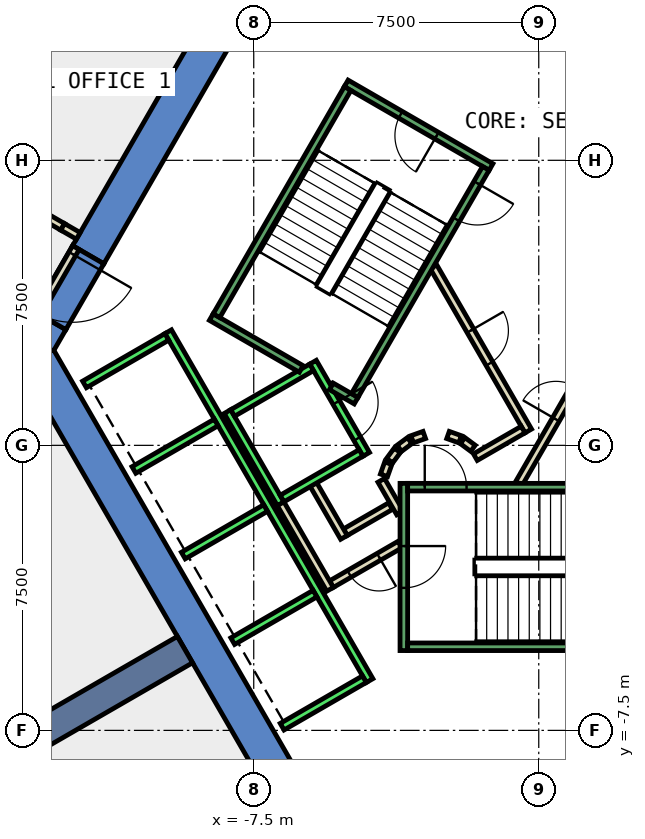
"""IFC4 building model, lengths in metres.
Left out: names, types, materials, properties, quantities, classifications, styles, units other than length and angle.
Written with IfcOpenShell. Run it as: python <this file> out.ifc"""

import sys

from ifc_helpers import new_model, si_unit, direction, frame, frame_2d, origin, place, context, subcontext, project, spatial, polyline, rectangle, outline, extrude, element, fill, save


model = new_model("IFC4")
c1 = context("Model", 3, precision=1e-05, world=origin(), true_north=direction((0.0, 1.0)))
c2 = subcontext(c1, "Body", "Model", "MODEL_VIEW")
j1 = project(units=[si_unit("LENGTHUNIT", "METRE"), si_unit("PLANEANGLEUNIT", "RADIAN")], contexts=[c1])
p1 = place(None, origin())
s1 = spatial("IfcSite", under=j1, at=p1, CompositionType="ELEMENT")
p2 = place(p1, origin())
s2 = spatial("IfcBuilding", under=s1, at=p2, CompositionType="ELEMENT")
p3 = place(p2, frame((0.0, 0.0, 72.8)))
s3 = spatial("IfcBuildingStorey", under=s2, at=p3, CompositionType="ELEMENT", Elevation=72.8)
p4 = place(p3, frame((0.0, 0.0, -0.4)))
e1 = element("IfcWall", 1, at=p4, inside=s3, PredefinedType="SHEAR", context=c2, shape_type="SweptSolid", body=[
    extrude(outline(polyline([(-12.267, 5.252), (-11.444, 4.777), (-6.38, 13.55), (-6.928, 14.5), (-12.267, 5.252)])), origin(), (0.0, 0.0, 1.0), 4.2),
])
p5 = place(p3, frame((0.0, 0.0, -0.4)))
e2 = element("IfcWall", 2, at=p5, inside=s3, PredefinedType="SHEAR", context=c2, shape_type="SweptSolid", body=[
    extrude(outline(polyline([(-12.444, 3.045), (-13.267, 3.52), (-13.856, 2.5), (-12.759, 2.5), (-12.444, 3.045)])), origin(), (0.0, 0.0, 1.0), 4.2),
])
p6 = place(p3, frame((0.0, 0.0, 3.6)))
e3 = element("IfcWall", 3, at=p6, inside=s3, PredefinedType="SHEAR", context=c2, shape_type="SweptSolid", body=[
    extrude(outline(polyline([(-13.267, 3.52), (-12.444, 3.045), (-11.444, 4.777), (-12.267, 5.252), (-13.267, 3.52)])), origin(), (0.0, 0.0, 1.0), 0.2),
])
p7 = place(p3, frame((0.0, 0.0, -0.4)))
e4 = element("IfcWall", 4, at=p7, inside=s3, PredefinedType="SHEAR", context=c2, shape_type="SweptSolid", body=[
    extrude(outline(polyline([(-13.856, 2.5), (-6.928, -9.5), (-6.38, -8.55), (-12.759, 2.5), (-13.856, 2.5)])), origin(), (0.0, 0.0, 1.0), 4.2),
])
p8 = place(p3, frame((-9.31, -5.375, -0.4), z_axis=(0.0, 0.0, 1.0), x_axis=(-0.866017533419, -0.500013631625, 0.0)))
e5 = element("IfcWall", 5, at=p8, inside=s3, PredefinedType="SHEAR", context=c2, shape_type="SweptSolid", body=[
    extrude(rectangle(XDim=9.0, YDim=0.8, at=frame_2d((4.5, 0.0))), origin(), (0.0, 0.0, 1.0), 4.2),
])
p9 = place(p3, frame((-17.133, 8.408, 0.0), z_axis=(0.0, 0.0, 1.0), x_axis=(0.866005140137, -0.500035096025, 0.0)))
e6 = element("IfcWall", 6, at=p9, inside=s3, PredefinedType="PARTITIONING", context=c2, shape_type="SweptSolid", body=[
    extrude(rectangle(XDim=5.317, YDim=0.2, at=frame_2d((2.659, 0.0))), origin(), (0.0, 0.0, 1.0), 3.8),
])
p10 = place(p9, frame((2.396, 0.0, 0.0)))
e7 = element("IfcOpeningElement", 7, at=p10, cuts=e6, PredefinedType="OPENING", context=c2, shape_type="SweptSolid", body=[
    extrude(rectangle(XDim=1.0, YDim=2.1, at=frame_2d((0.5, 1.05))), frame((0.0, 0.11, 0.0), z_axis=(0.0, -1.0, 0.0), x_axis=(1.0, 0.0, 0.0)), (0.0, 0.0, 1.0), 0.22),
])
p11 = place(p3, frame((-3.9, -1.599, 0.0), z_axis=(0.0, 0.0, 1.0), x_axis=(-0.865969445389, -0.500096910261, 0.0)))
e8 = element("IfcWall", 8, at=p11, inside=s3, PredefinedType="PARTITIONING", context=c2, shape_type="SweptSolid", body=[
    extrude(rectangle(XDim=1.373, YDim=0.2, at=frame_2d((0.687, 0.0))), origin(), (0.0, 0.0, 1.0), 3.8),
])
p12 = place(p3, frame((-5.126, -2.422, 0.0), z_axis=(0.0, 0.0, 1.0), x_axis=(-0.500062241894, 0.865989465428, 0.0)))
e9 = element("IfcWall", 9, at=p12, inside=s3, PredefinedType="PARTITIONING", context=c2, shape_type="SweptSolid", body=[
    extrude(rectangle(XDim=1.7, YDim=0.2, at=frame_2d((0.85, 0.0))), origin(), (0.0, 0.0, 1.0), 3.8),
])
p13 = place(p3, frame((-3.65, -2.61, 0.0), z_axis=(0.0, 0.0, 1.0), x_axis=(-0.866072462134, -0.499918483688, 0.0)))
e10 = element("IfcWall", 10, at=p13, inside=s3, PredefinedType="PARTITIONING", context=c2, shape_type="SweptSolid", body=[
    extrude(rectangle(XDim=2.084, YDim=0.2, at=frame_2d((1.042, 0.0))), origin(), (0.0, 0.0, 1.0), 3.8),
])
p14 = place(p13, frame((0.642, 0.0, 0.0)))
e11 = element("IfcOpeningElement", 11, at=p14, cuts=e10, PredefinedType="OPENING", context=c2, shape_type="SweptSolid", body=[
    extrude(rectangle(XDim=0.9, YDim=2.1, at=frame_2d((0.45, 1.05))), frame((0.0, 0.11, 0.0), z_axis=(0.0, -1.0, 0.0), x_axis=(1.0, 0.0, 0.0)), (0.0, 0.0, 1.0), 0.22),
])
p15 = place(p3, frame((-5.492, -3.788, 0.0), z_axis=(0.0, 0.0, 1.0), x_axis=(-0.500008949224, 0.866020236886, 0.0)))
e12 = element("IfcWall", 12, at=p15, inside=s3, PredefinedType="PARTITIONING", context=c2, shape_type="SweptSolid", body=[
    extrude(rectangle(XDim=2.68, YDim=0.2, at=frame_2d((1.34, 0.0))), origin(), (0.0, 0.0, 1.0), 3.8),
])
p16 = place(p3, frame((-4.145, -0.92, 0.0), z_axis=(0.0, 0.0, 1.0), x_axis=(0.499743786207, -0.866173278362, 0.0)))
e13 = element("IfcWall", 13, at=p16, inside=s3, PredefinedType="PARTITIONING", context=c2, shape_type="SweptSolid", body=[
    extrude(rectangle(XDim=0.991, YDim=0.2, at=frame_2d((0.495, 0.0))), origin(), (0.0, 0.0, 1.0), 3.8),
])
p17 = place(p3, frame((-0.52, -1.0, 0.0), z_axis=(0.0, 0.0, 1.0), x_axis=(0.50011622646, 0.865958290007, 0.0)))
e14 = element("IfcWall", 14, at=p17, inside=s3, PredefinedType="PARTITIONING", context=c2, shape_type="SweptSolid", body=[
    extrude(rectangle(XDim=4.991, YDim=0.2, at=frame_2d((2.496, 0.0))), origin(), (0.0, 0.0, 1.0), 3.8),
])
p18 = place(p17, frame((1.945, 0.0, 0.0)))
e15 = element("IfcOpeningElement", 15, at=p18, cuts=e14, PredefinedType="OPENING", context=c2, shape_type="SweptSolid", body=[
    extrude(rectangle(XDim=1.0, YDim=2.1, at=frame_2d((0.5, 1.05))), frame((0.0, 0.11, 0.0), z_axis=(0.0, -1.0, 0.0), x_axis=(1.0, 0.0, 0.0)), (0.0, 0.0, 1.0), 0.22),
])
p19 = place(p3, frame((-2.771, 4.7, 0.0), z_axis=(0.0, 0.0, 1.0), x_axis=(0.499969479948, -0.866043023828, 0.0)))
e16 = element("IfcWall", 16, at=p19, inside=s3, PredefinedType="PARTITIONING", context=c2, shape_type="SweptSolid", body=[
    extrude(rectangle(XDim=4.99, YDim=0.2, at=frame_2d((2.495, 0.0))), origin(), (0.0, 0.0, 1.0), 3.8),
])
p20 = place(p19, frame((1.945, 0.0, 0.0)))
e17 = element("IfcOpeningElement", 17, at=p20, cuts=e16, PredefinedType="OPENING", context=c2, shape_type="SweptSolid", body=[
    extrude(rectangle(XDim=1.0, YDim=2.1, at=frame_2d((0.5, 1.05))), frame((0.0, 0.11, 0.0), z_axis=(0.0, -1.0, 0.0), x_axis=(1.0, 0.0, 0.0)), (0.0, 0.0, 1.0), 0.22),
])
p21 = place(p3, frame((-0.412, 0.414, 0.0), z_axis=(0.0, 0.0, 1.0), x_axis=(-0.866017369001, -0.500013916395, 0.0)))
e18 = element("IfcWall", 18, at=p21, inside=s3, PredefinedType="PARTITIONING", context=c2, shape_type="SweptSolid", body=[
    extrude(rectangle(XDim=1.45, YDim=0.2, at=frame_2d((0.725, 0.0))), origin(), (0.0, 0.0, 1.0), 3.8),
])
p22 = place(p3, frame((-1.731, -0.077, 0.0), z_axis=(0.0, 0.0, 1.0), x_axis=(-0.804311165252, 0.594208338422, 0.0)))
e19 = element("IfcWall", 19, at=p22, inside=s3, PredefinedType="PARTITIONING", context=c2, shape_type="SweptSolid", body=[
    extrude(rectangle(XDim=0.338, YDim=0.2, at=frame_2d((0.169, 0.0))), origin(), (0.0, 0.0, 1.0), 3.8),
])
p23 = place(p3, frame((-2.07, 0.16, 0.0), z_axis=(0.0, 0.0, 1.0), x_axis=(-0.942199461132, 0.335052496547, 0.0)))
e20 = element("IfcWall", 20, at=p23, inside=s3, PredefinedType="PARTITIONING", context=c2, shape_type="SweptSolid", body=[
    extrude(rectangle(XDim=0.337, YDim=0.2, at=frame_2d((0.169, 0.0))), origin(), (0.0, 0.0, 1.0), 3.8),
])
p24 = place(p3, frame((-3.012, 0.273, 0.0), z_axis=(0.0, 0.0, 1.0), x_axis=(-0.942280615813, -0.334824194261, 0.0)))
e21 = element("IfcWall", 21, at=p24, inside=s3, PredefinedType="PARTITIONING", context=c2, shape_type="SweptSolid", body=[
    extrude(rectangle(XDim=0.338, YDim=0.2, at=frame_2d((0.169, 0.0))), origin(), (0.0, 0.0, 1.0), 3.8),
])
p25 = place(p3, frame((-3.397, 0.124, 0.0), z_axis=(0.0, 0.0, 1.0), x_axis=(-0.804311165252, -0.594208338422, 0.0)))
e22 = element("IfcWall", 22, at=p25, inside=s3, PredefinedType="PARTITIONING", context=c2, shape_type="SweptSolid", body=[
    extrude(rectangle(XDim=0.338, YDim=0.2, at=frame_2d((0.169, 0.0))), origin(), (0.0, 0.0, 1.0), 3.8),
])
p26 = place(p3, frame((-3.723, -0.131, 0.0), z_axis=(0.0, 0.0, 1.0), x_axis=(-0.594675113454, -0.803966112121, 0.0)))
e23 = element("IfcWall", 23, at=p26, inside=s3, PredefinedType="PARTITIONING", context=c2, shape_type="SweptSolid", body=[
    extrude(rectangle(XDim=0.338, YDim=0.2, at=frame_2d((0.169, 0.0))), origin(), (0.0, 0.0, 1.0), 3.8),
])
p27 = place(p3, frame((-3.96, -0.47, 0.0), z_axis=(0.0, 0.0, 1.0), x_axis=(-0.334824194261, -0.942280615813, 0.0)))
e24 = element("IfcWall", 24, at=p27, inside=s3, PredefinedType="PARTITIONING", context=c2, shape_type="SweptSolid", body=[
    extrude(rectangle(XDim=0.338, YDim=0.2, at=frame_2d((0.169, 0.0))), origin(), (0.0, 0.0, 1.0), 3.8),
])
p28 = place(p3, frame((-12.18, 5.202, 0.0), z_axis=(0.0, 0.0, 1.0), x_axis=(-0.50002537861, -0.866010750942, 0.0)))
e25 = element("IfcWall", 25, at=p28, inside=s3, PredefinedType="PARTITIONING", context=c2, shape_type="SweptSolid", body=[
    extrude(rectangle(XDim=2.0, YDim=0.2, at=frame_2d((1.0, 0.0))), origin(), (0.0, 0.0, 1.0), 2.4),
])
p29 = place(p28, frame((0.19, 0.0, 0.0)))
e26 = element("IfcOpeningElement", 26, at=p29, cuts=e25, PredefinedType="OPENING", context=c2, shape_type="SweptSolid", body=[
    extrude(rectangle(XDim=1.8, YDim=2.1, at=frame_2d((0.9, 1.05))), frame((0.0, 0.11, 0.0), z_axis=(0.0, -1.0, 0.0), x_axis=(1.0, 0.0, 0.0)), (0.0, 0.0, 1.0), 0.22),
])
p30 = place(p3, frame((-12.528, 5.749, 0.0), z_axis=(0.0, 0.0, 1.0), x_axis=(0.866305462299, -0.499514610387, 0.0)))
e27 = element("IfcWall", 27, at=p30, inside=s3, PredefinedType="PARTITIONING", context=c2, shape_type="SweptSolid", body=[
    extrude(rectangle(XDim=0.475, YDim=0.2, at=frame_2d((0.237, 0.0))), origin(), (0.0, 0.0, 1.0), 2.4),
])
p31 = place(p3, frame((-5.94, 2.188, 0.0), z_axis=(0.0, 0.0, 1.0), x_axis=(0.49994636267, -0.866056369097, 0.0)))
e28 = element("IfcWall", 28, at=p31, inside=s3, PredefinedType="STANDARD", context=c2, shape_type="SweptSolid", body=[
    extrude(rectangle(XDim=2.8, YDim=0.2, at=frame_2d((1.4, 0.0))), origin(), (0.0, 0.0, 1.0), 3.8),
])
p32 = place(p31, frame((1.225, 0.0, 0.0)))
e29 = element("IfcOpeningElement", 29, at=p32, cuts=e28, PredefinedType="OPENING", context=c2, shape_type="SweptSolid", body=[
    extrude(rectangle(XDim=1.1, YDim=2.1, at=frame_2d((0.55, 1.05))), frame((0.0, 0.11, 0.0), z_axis=(0.0, -1.0, 0.0), x_axis=(1.0, 0.0, 0.0)), (0.0, 0.0, 1.0), 0.22),
])
p33 = place(p3, frame((-8.192, 0.888, 0.0), z_axis=(0.0, 0.0, 1.0), x_axis=(0.49994636267, -0.866056369097, 0.0)))
e30 = element("IfcWall", 30, at=p33, inside=s3, PredefinedType="STANDARD", context=c2, shape_type="SweptSolid", body=[
    extrude(rectangle(XDim=2.8, YDim=0.2, at=frame_2d((1.4, 0.0))), origin(), (0.0, 0.0, 1.0), 3.8),
])
for number, where, z_axis, x_axis in (
    (31, (-5.977, 2.052, 0.0), (0.0, 0.0, 1.0), (-0.866, -0.5, 0.0)),
    (32, (-4.677, -0.2, 0.0), (0.0, 0.0, 1.0), (-0.866, -0.5, 0.0)),
):
    element("IfcWall", number, at=place(p3, frame(where, z_axis=z_axis, x_axis=x_axis)), inside=s3, PredefinedType="STANDARD", context=c2, shape_type="SweptSolid", body=[
        extrude(rectangle(XDim=2.399, YDim=0.2, at=frame_2d((1.2, 0.0))), origin(), (0.0, 0.0, 1.0), 3.8),
    ])
p34 = place(p3, frame((-9.751, 2.99, 0.0), z_axis=(0.0, 0.0, 1.0), x_axis=(0.50000090737, -0.866024879913, 0.0)))
e33 = element("IfcWall", 33, at=p34, inside=s3, PredefinedType="STANDARD", context=c2, shape_type="SweptSolid", body=[
    extrude(rectangle(XDim=10.6, YDim=0.2, at=frame_2d((5.3, 0.0))), origin(), (0.0, 0.0, 1.0), 3.8),
])
p35 = place(p3, frame((-9.788, 2.853, 0.0), z_axis=(0.0, 0.0, 1.0), x_axis=(-0.865998541277, -0.500046524342, 0.0)))
e34 = element("IfcWall", 34, at=p35, inside=s3, PredefinedType="STANDARD", context=c2, shape_type="SweptSolid", body=[
    extrude(rectangle(XDim=2.5, YDim=0.2, at=frame_2d((1.25, 0.0))), origin(), (0.0, 0.0, 1.0), 3.8),
])
for number, where, z_axis, x_axis in (
    (35, (-8.488, 0.602, 0.0), (0.0, 0.0, 1.0), (-0.866, -0.5, 0.0)),
    (36, (-7.188, -1.65, 0.0), (0.0, 0.0, 1.0), (-0.866, -0.5, 0.0)),
    (37, (-5.888, -3.902, 0.0), (0.0, 0.0, 1.0), (-0.866, -0.5, 0.0)),
    (38, (-4.588, -6.153, 0.0), (0.0, 0.0, 1.0), (-0.866, -0.5, 0.0)),
):
    element("IfcWall", number, at=place(p3, frame(where, z_axis=z_axis, x_axis=x_axis)), inside=s3, PredefinedType="STANDARD", context=c2, shape_type="SweptSolid", body=[
        extrude(rectangle(XDim=2.5, YDim=0.2, at=frame_2d((1.25, 0.0))), origin(), (0.0, 0.0, 1.0), 3.8),
    ])
p36 = place(p3, frame((-3.55, -1.0, 0.0), z_axis=(0.0, 0.0, 1.0), x_axis=(0.0, -1.0, 0.0)))
e39 = element("IfcWall", 39, at=p36, inside=s3, PredefinedType="STANDARD", context=c2, shape_type="SweptSolid", body=[
    extrude(rectangle(XDim=4.4, YDim=0.2, at=frame_2d((2.2, 0.0))), origin(), (0.0, 0.0, 1.0), 3.8),
])
p37 = place(p36, frame((1.65, 0.0, 0.0)))
e40 = element("IfcOpeningElement", 40, at=p37, cuts=e39, PredefinedType="OPENING", context=c2, shape_type="SweptSolid", body=[
    extrude(rectangle(XDim=1.1, YDim=2.2, at=frame_2d((0.55, 1.1))), frame((0.0, 0.11, 0.0), z_axis=(0.0, -1.0, 0.0), x_axis=(1.0, 0.0, 0.0)), (0.0, 0.0, 1.0), 0.22),
])
p38 = place(p3, frame((-3.45, -1.1, 0.0), z_axis=(0.0, 0.0, 1.0), x_axis=(1.0, 0.0, 0.0)))
e41 = element("IfcWall", 41, at=p38, inside=s3, PredefinedType="STANDARD", context=c2, shape_type="SweptSolid", body=[
    extrude(rectangle(XDim=6.9, YDim=0.2, at=frame_2d((3.45, 0.0))), origin(), (0.0, 0.0, 1.0), 3.8),
])
p39 = place(p38, frame((0.45, 0.0, 0.0)))
e42 = element("IfcOpeningElement", 42, at=p39, cuts=e41, PredefinedType="OPENING", context=c2, shape_type="SweptSolid", body=[
    extrude(rectangle(XDim=1.1, YDim=2.2, at=frame_2d((0.55, 1.1))), frame((0.0, 0.11, 0.0), z_axis=(0.0, -1.0, 0.0), x_axis=(1.0, 0.0, 0.0)), (0.0, 0.0, 1.0), 0.22),
])
p40 = place(p3, frame((-3.45, -5.3, 0.0), z_axis=(0.0, 0.0, 1.0), x_axis=(1.0, 0.0, 0.0)))
e43 = element("IfcWall", 43, at=p40, inside=s3, PredefinedType="STANDARD", context=c2, shape_type="SweptSolid", body=[
    extrude(rectangle(XDim=6.9, YDim=0.2, at=frame_2d((3.45, 0.0))), origin(), (0.0, 0.0, 1.0), 3.8),
])
p41 = place(p3, frame((-1.256, 7.324, 0.0), z_axis=(0.0, 0.0, 1.0), x_axis=(-0.866046073146, 0.499964197906, 0.0)))
e44 = element("IfcWall", 44, at=p41, inside=s3, PredefinedType="STANDARD", context=c2, shape_type="SweptSolid", body=[
    extrude(rectangle(XDim=4.4, YDim=0.2, at=frame_2d((2.2, 0.0))), origin(), (0.0, 0.0, 1.0), 3.8),
])
p42 = place(p41, frame((1.65, 0.0, 0.0)))
e45 = element("IfcOpeningElement", 45, at=p42, cuts=e44, PredefinedType="OPENING", context=c2, shape_type="SweptSolid", body=[
    extrude(rectangle(XDim=1.1, YDim=2.2, at=frame_2d((0.55, 1.1))), frame((0.0, 0.11, 0.0), z_axis=(0.0, -1.0, 0.0), x_axis=(1.0, 0.0, 0.0)), (0.0, 0.0, 1.0), 0.22),
])
p43 = place(p3, frame((-6.25, 2.01, 0.0), z_axis=(0.0, 0.0, 1.0), x_axis=(-0.86611865017, 0.499838457731, 0.0)))
e46 = element("IfcWall", 46, at=p43, inside=s3, PredefinedType="STANDARD", context=c2, shape_type="SweptSolid", body=[
    extrude(rectangle(XDim=2.733, YDim=0.2, at=frame_2d((1.366, 0.0))), origin(), (0.0, 0.0, 1.0), 3.8),
])
p44 = place(p3, frame((-4.806, 1.176, 0.0), z_axis=(0.0, 0.0, 1.0), x_axis=(-0.866558586415, 0.499075361355, 0.0)))
e47 = element("IfcWall", 47, at=p44, inside=s3, PredefinedType="STANDARD", context=c2, shape_type="SweptSolid", body=[
    extrude(rectangle(XDim=0.751, YDim=0.2, at=frame_2d((0.376, 0.0))), origin(), (0.0, 0.0, 1.0), 3.8),
])
p45 = place(p3, frame((-1.393, 7.288, 0.0), z_axis=(0.0, 0.0, 1.0), x_axis=(-0.499963383562, -0.866046543262, 0.0)))
e48 = element("IfcWall", 48, at=p45, inside=s3, PredefinedType="STANDARD", context=c2, shape_type="SweptSolid", body=[
    extrude(rectangle(XDim=6.9, YDim=0.2, at=frame_2d((3.45, 0.0))), origin(), (0.0, 0.0, 1.0), 3.8),
])
p46 = place(p45, frame((0.45, 0.0, 0.0)))
e49 = element("IfcOpeningElement", 49, at=p46, cuts=e48, PredefinedType="OPENING", context=c2, shape_type="SweptSolid", body=[
    extrude(rectangle(XDim=1.1, YDim=2.2, at=frame_2d((0.55, 1.1))), frame((0.0, 0.11, 0.0), z_axis=(0.0, -1.0, 0.0), x_axis=(1.0, 0.0, 0.0)), (0.0, 0.0, 1.0), 0.22),
])
p47 = place(p3, frame((-5.03, 9.388, 0.0), z_axis=(0.0, 0.0, 1.0), x_axis=(-0.499978703459, -0.866037698999, 0.0)))
e50 = element("IfcWall", 50, at=p47, inside=s3, PredefinedType="STANDARD", context=c2, shape_type="SweptSolid", body=[
    extrude(rectangle(XDim=6.9, YDim=0.2, at=frame_2d((3.45, 0.0))), origin(), (0.0, 0.0, 1.0), 3.8),
])
p48 = place(p18, origin())
e51 = element("IfcDoor", 51, at=p48, inside=s3, OperationType="SINGLE_SWING_LEFT", PredefinedType="DOOR", context=c2, shape_type="SweptSolid", body=[
    extrude(rectangle(XDim=1.0, YDim=2.1, at=frame_2d((0.5, 1.05))), frame((0.0, 0.025, 0.0), z_axis=(0.0, -1.0, 0.0), x_axis=(1.0, 0.0, 0.0)), (0.0, 0.0, 1.0), 0.05),
])
fill(e15, e51)
p49 = place(p20, origin())
e52 = element("IfcDoor", 52, at=p49, inside=s3, OperationType="SINGLE_SWING_RIGHT", PredefinedType="DOOR", context=c2, shape_type="SweptSolid", body=[
    extrude(rectangle(XDim=1.0, YDim=2.1, at=frame_2d((0.5, 1.05))), frame((0.0, 0.025, 0.0), z_axis=(0.0, -1.0, 0.0), x_axis=(1.0, 0.0, 0.0)), (0.0, 0.0, 1.0), 0.05),
])
fill(e17, e52)
p50 = place(p14, origin())
e53 = element("IfcDoor", 53, at=p50, inside=s3, OperationType="SINGLE_SWING_LEFT", PredefinedType="DOOR", context=c2, shape_type="SweptSolid", body=[
    extrude(rectangle(XDim=0.9, YDim=2.1, at=frame_2d((0.45, 1.05))), frame((0.0, 0.025, 0.0), z_axis=(0.0, -1.0, 0.0), x_axis=(1.0, 0.0, 0.0)), (0.0, 0.0, 1.0), 0.05),
])
fill(e11, e53)
p51 = place(p29, origin())
e54 = element("IfcDoor", 54, at=p51, inside=s3, OperationType="DOUBLE_DOOR_SINGLE_SWING", PredefinedType="DOOR", context=c2, shape_type="SweptSolid", body=[
    extrude(rectangle(XDim=1.8, YDim=2.1, at=frame_2d((0.9, 1.05))), frame((0.0, 0.025, 0.0), z_axis=(0.0, -1.0, 0.0), x_axis=(1.0, 0.0, 0.0)), (0.0, 0.0, 1.0), 0.05),
])
fill(e26, e54)
p52 = place(p32, origin())
e55 = element("IfcDoor", 55, at=p52, inside=s3, OperationType="SLIDING_TO_LEFT", PredefinedType="DOOR", context=c2, shape_type="SweptSolid", body=[
    extrude(rectangle(XDim=1.1, YDim=2.1, at=frame_2d((0.55, 1.05))), frame((0.0, 0.025, 0.0), z_axis=(0.0, -1.0, 0.0), x_axis=(1.0, 0.0, 0.0)), (0.0, 0.0, 1.0), 0.05),
])
fill(e29, e55)
p53 = place(p39, origin())
e56 = element("IfcDoor", 56, at=p53, inside=s3, OperationType="SINGLE_SWING_LEFT", PredefinedType="DOOR", context=c2, shape_type="SweptSolid", body=[
    extrude(rectangle(XDim=1.1, YDim=2.2, at=frame_2d((0.55, 1.1))), frame((0.0, 0.025, 0.0), z_axis=(0.0, -1.0, 0.0), x_axis=(1.0, 0.0, 0.0)), (0.0, 0.0, 1.0), 0.05),
])
fill(e42, e56)
p54 = place(p37, origin())
e57 = element("IfcDoor", 57, at=p54, inside=s3, OperationType="SINGLE_SWING_LEFT", PredefinedType="DOOR", context=c2, shape_type="SweptSolid", body=[
    extrude(rectangle(XDim=1.1, YDim=2.2, at=frame_2d((0.55, 1.1))), frame((0.0, 0.025, 0.0), z_axis=(0.0, -1.0, 0.0), x_axis=(1.0, 0.0, 0.0)), (0.0, 0.0, 1.0), 0.05),
])
fill(e40, e57)
p55 = place(p46, origin())
e58 = element("IfcDoor", 58, at=p55, inside=s3, OperationType="SINGLE_SWING_LEFT", PredefinedType="DOOR", context=c2, shape_type="SweptSolid", body=[
    extrude(rectangle(XDim=1.1, YDim=2.2, at=frame_2d((0.55, 1.1))), frame((0.0, 0.025, 0.0), z_axis=(0.0, -1.0, 0.0), x_axis=(1.0, 0.0, 0.0)), (0.0, 0.0, 1.0), 0.05),
])
fill(e49, e58)
p56 = place(p42, origin())
e59 = element("IfcDoor", 59, at=p56, inside=s3, OperationType="SINGLE_SWING_LEFT", PredefinedType="DOOR", context=c2, shape_type="SweptSolid", body=[
    extrude(rectangle(XDim=1.1, YDim=2.2, at=frame_2d((0.55, 1.1))), frame((0.0, 0.025, 0.0), z_axis=(0.0, -1.0, 0.0), x_axis=(1.0, 0.0, 0.0)), (0.0, 0.0, 1.0), 0.05),
])
fill(e45, e59)
save(model, sys.argv[1])
